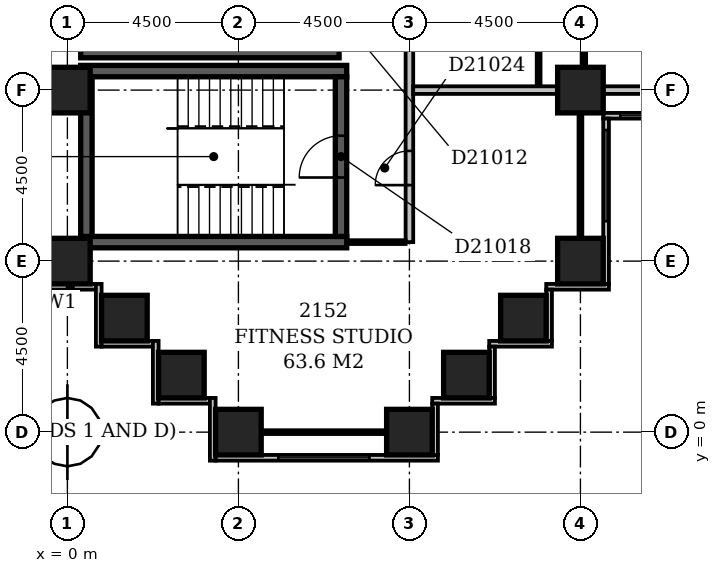
"""IFC4 building model, lengths in metres.
Left out: names, types, materials, properties, quantities, classifications, styles, units other than length and angle.
Written with IfcOpenShell. Run it as: python <this file> out.ifc"""

import sys

from ifc_helpers import new_model, si_unit, direction, frame, frame_2d, origin, origin_2d, place, context, subcontext, project, spatial, rectangle, extrude, element, fill, save


model = new_model("IFC4")
c1 = context("Model", 3, precision=1e-05, world=origin(), true_north=direction((0.0, 1.0)))
c2 = subcontext(c1, "Body", "Model", "MODEL_VIEW")
j1 = project(units=[si_unit("LENGTHUNIT", "METRE"), si_unit("PLANEANGLEUNIT", "RADIAN")], contexts=[c1])
p1 = place(None, origin())
s1 = spatial("IfcSite", under=j1, at=p1, CompositionType="ELEMENT")
p2 = place(p1, origin())
s2 = spatial("IfcBuilding", under=s1, at=p2, CompositionType="ELEMENT")
p3 = place(p2, frame((0.0, 0.0, 86.6)))
s3 = spatial("IfcBuildingStorey", under=s2, at=p3, CompositionType="ELEMENT", Elevation=86.6)
for number, where, z_axis, x_axis in (
    (1, (0.35, 5.0, -0.3), (0.0, 0.0, 1.0), (1.0, 0.0, 0.0)),
    (2, (0.35, 9.5, -0.3), (0.0, 0.0, 1.0), (1.0, 0.0, 0.0)),
):
    element("IfcWall", number, at=place(p3, frame(where, z_axis=z_axis, x_axis=x_axis)), inside=s3, PredefinedType="SHEAR", context=c2, shape_type="SweptSolid", body=[
        extrude(rectangle(XDim=7.0, YDim=0.3, at=frame_2d((3.5, 0.0))), origin(), (0.0, 0.0, 1.0), 3.6),
    ])
p4 = place(p3, frame((0.35, 10.0, -0.3), z_axis=(0.0, 0.0, 1.0), x_axis=(1.0, 0.0, 0.0)))
e3 = element("IfcWall", 3, at=p4, inside=s3, PredefinedType="SHEAR", context=c2, shape_type="SweptSolid", body=[
    extrude(rectangle(XDim=6.8, YDim=0.3, at=frame_2d((3.4, 0.0))), origin(), (0.0, 0.0, 1.0), 3.6),
])
p5 = place(p3, frame((0.5, 5.15, -0.3), z_axis=(0.0, 0.0, 1.0), x_axis=(0.0, 1.0, 0.0)))
e4 = element("IfcWall", 4, at=p5, inside=s3, PredefinedType="SHEAR", context=c2, shape_type="SweptSolid", body=[
    extrude(rectangle(XDim=4.2, YDim=0.3, at=frame_2d((2.1, 0.0))), origin(), (0.0, 0.0, 1.0), 3.6),
])
p6 = place(p3, frame((7.2, 5.15, -0.3), z_axis=(0.0, 0.0, 1.0), x_axis=(0.0, 1.0, 0.0)))
e5 = element("IfcWall", 5, at=p6, inside=s3, PredefinedType="SHEAR", context=c2, shape_type="SweptSolid", body=[
    extrude(rectangle(XDim=4.2, YDim=0.3, at=frame_2d((2.1, 0.0))), origin(), (0.0, 0.0, 1.0), 3.6),
])
p7 = place(p6, frame((1.55, 0.0, 0.3)))
e6 = element("IfcOpeningElement", 6, at=p7, cuts=e5, PredefinedType="OPENING", context=c2, shape_type="SweptSolid", body=[
    extrude(rectangle(XDim=1.1, YDim=2.1, at=frame_2d((0.55, 1.05))), frame((0.0, 0.162, 0.0), z_axis=(0.0, -1.0, 0.0), x_axis=(1.0, 0.0, 0.0)), (0.0, 0.0, 1.0), 0.324),
])
for number, where, z_axis, x_axis in (
    (7, (4.5, 0.0, -0.3), (0.0, 0.0, 1.0), (1.0, 0.0, 0.0)),
    (8, (9.0, 0.0, -0.3), (0.0, 0.0, 1.0), (1.0, 0.0, 0.0)),
    (9, (3.0, 1.5, -0.3), (0.0, 0.0, 1.0), (1.0, 0.0, 0.0)),
    (10, (10.5, 1.5, -0.3), (0.0, 0.0, 1.0), (1.0, 0.0, 0.0)),
    (11, (1.5, 3.0, -0.3), (0.0, 0.0, 1.0), (1.0, 0.0, 0.0)),
    (12, (12.0, 3.0, -0.3), (0.0, 0.0, 1.0), (1.0, 0.0, 0.0)),
    (13, (0.0, 4.5, -0.3), (0.0, 0.0, 1.0), (1.0, 0.0, 0.0)),
    (14, (13.5, 4.5, -0.3), (0.0, 0.0, 1.0), (1.0, 0.0, 0.0)),
    (15, (0.0, 9.0, -0.3), (0.0, 0.0, 1.0), (1.0, 0.0, 0.0)),
    (16, (13.5, 9.0, -0.3), (0.0, 0.0, 1.0), (1.0, 0.0, 0.0)),
):
    element("IfcColumn", number, at=place(p3, frame(where, z_axis=z_axis, x_axis=x_axis)), inside=s3, PredefinedType="COLUMN", context=c2, shape_type="SweptSolid", body=[
        extrude(rectangle(XDim=1.2, YDim=1.2, at=origin_2d()), origin(), (0.0, 0.0, 1.0), 3.6),
    ])
p8 = place(p3, frame((9.675, -0.6, 0.0), z_axis=(0.0, 0.0, 1.0), x_axis=(0.0, 1.0, 0.0)))
e17 = element("IfcWall", 17, at=p8, inside=s3, PredefinedType="STANDARD", context=c2, shape_type="SweptSolid", body=[
    extrude(rectangle(XDim=1.35, YDim=0.15, at=frame_2d((0.675, 0.0))), origin(), (0.0, 0.0, 1.0), 2.7),
])
p9 = place(p3, frame((9.6, 0.825, 0.0), z_axis=(0.0, 0.0, 1.0), x_axis=(1.0, 0.0, 0.0)))
e18 = element("IfcWall", 18, at=p9, inside=s3, PredefinedType="STANDARD", context=c2, shape_type="SweptSolid", body=[
    extrude(rectangle(XDim=1.65, YDim=0.15, at=frame_2d((0.825, 0.0))), origin(), (0.0, 0.0, 1.0), 2.7),
])
p10 = place(p3, frame((11.175, 0.9, 0.0), z_axis=(0.0, 0.0, 1.0), x_axis=(0.0, 1.0, 0.0)))
e19 = element("IfcWall", 19, at=p10, inside=s3, PredefinedType="STANDARD", context=c2, shape_type="SweptSolid", body=[
    extrude(rectangle(XDim=1.35, YDim=0.15, at=frame_2d((0.675, 0.0))), origin(), (0.0, 0.0, 1.0), 2.7),
])
p11 = place(p3, frame((11.1, 2.325, 0.0), z_axis=(0.0, 0.0, 1.0), x_axis=(1.0, 0.0, 0.0)))
e20 = element("IfcWall", 20, at=p11, inside=s3, PredefinedType="STANDARD", context=c2, shape_type="SweptSolid", body=[
    extrude(rectangle(XDim=1.65, YDim=0.15, at=frame_2d((0.825, 0.0))), origin(), (0.0, 0.0, 1.0), 2.7),
])
p12 = place(p3, frame((12.675, 2.4, 0.0), z_axis=(0.0, 0.0, 1.0), x_axis=(0.0, 1.0, 0.0)))
e21 = element("IfcWall", 21, at=p12, inside=s3, PredefinedType="STANDARD", context=c2, shape_type="SweptSolid", body=[
    extrude(rectangle(XDim=1.35, YDim=0.15, at=frame_2d((0.675, 0.0))), origin(), (0.0, 0.0, 1.0), 2.7),
])
p13 = place(p3, frame((12.6, 3.825, 0.0), z_axis=(0.0, 0.0, 1.0), x_axis=(1.0, 0.0, 0.0)))
e22 = element("IfcWall", 22, at=p13, inside=s3, PredefinedType="STANDARD", context=c2, shape_type="SweptSolid", body=[
    extrude(rectangle(XDim=1.65, YDim=0.15, at=frame_2d((0.825, 0.0))), origin(), (0.0, 0.0, 1.0), 2.7),
])
p14 = place(p3, frame((14.175, 3.9, 0.0), z_axis=(0.0, 0.0, 1.0), x_axis=(0.0, 1.0, 0.0)))
e23 = element("IfcWall", 23, at=p14, inside=s3, PredefinedType="STANDARD", context=c2, shape_type="SweptSolid", body=[
    extrude(rectangle(XDim=4.35, YDim=0.15, at=frame_2d((2.175, 0.0))), origin(), (0.0, 0.0, 1.0), 2.7),
])
p15 = place(p14, frame((1.65, 0.0, 0.6)))
e24 = element("IfcOpeningElement", 24, at=p15, cuts=e23, PredefinedType="OPENING", context=c2, shape_type="SweptSolid", body=[
    extrude(rectangle(XDim=2.4, YDim=1.8, at=frame_2d((1.2, 0.9))), frame((0.0, 0.087, 0.0), z_axis=(0.0, -1.0, 0.0), x_axis=(1.0, 0.0, 0.0)), (0.0, 0.0, 1.0), 0.174),
])
p16 = place(p3, frame((14.1, 8.325, 0.0), z_axis=(0.0, 0.0, 1.0), x_axis=(1.0, 0.0, 0.0)))
e25 = element("IfcWall", 25, at=p16, inside=s3, PredefinedType="STANDARD", context=c2, shape_type="SweptSolid", body=[
    extrude(rectangle(XDim=4.65, YDim=0.15, at=frame_2d((2.325, 0.0))), origin(), (0.0, 0.0, 1.0), 2.7),
])
p17 = place(p16, frame((0.45, 0.0, 0.6)))
e26 = element("IfcOpeningElement", 26, at=p17, cuts=e25, PredefinedType="OPENING", context=c2, shape_type="SweptSolid", body=[
    extrude(rectangle(XDim=2.4, YDim=1.8, at=frame_2d((1.2, 0.9))), frame((0.0, 0.087, 0.0), z_axis=(0.0, -1.0, 0.0), x_axis=(1.0, 0.0, 0.0)), (0.0, 0.0, 1.0), 0.174),
])
p18 = place(p3, frame((-0.6, 3.825, 0.0), z_axis=(0.0, 0.0, 1.0), x_axis=(1.0, 0.0, 0.0)))
e27 = element("IfcWall", 27, at=p18, inside=s3, PredefinedType="STANDARD", context=c2, shape_type="SweptSolid", body=[
    extrude(rectangle(XDim=1.35, YDim=0.15, at=frame_2d((0.675, 0.0))), origin(), (0.0, 0.0, 1.0), 2.7),
])
p19 = place(p3, frame((0.825, 3.9, 0.0), z_axis=(0.0, 0.0, 1.0), x_axis=(0.0, -1.0, 0.0)))
e28 = element("IfcWall", 28, at=p19, inside=s3, PredefinedType="STANDARD", context=c2, shape_type="SweptSolid", body=[
    extrude(rectangle(XDim=1.65, YDim=0.15, at=frame_2d((0.825, 0.0))), origin(), (0.0, 0.0, 1.0), 2.7),
])
p20 = place(p3, frame((0.9, 2.325, 0.0), z_axis=(0.0, 0.0, 1.0), x_axis=(1.0, 0.0, 0.0)))
e29 = element("IfcWall", 29, at=p20, inside=s3, PredefinedType="STANDARD", context=c2, shape_type="SweptSolid", body=[
    extrude(rectangle(XDim=1.35, YDim=0.15, at=frame_2d((0.675, 0.0))), origin(), (0.0, 0.0, 1.0), 2.7),
])
p21 = place(p3, frame((2.325, 2.4, 0.0), z_axis=(0.0, 0.0, 1.0), x_axis=(0.0, -1.0, 0.0)))
e30 = element("IfcWall", 30, at=p21, inside=s3, PredefinedType="STANDARD", context=c2, shape_type="SweptSolid", body=[
    extrude(rectangle(XDim=1.65, YDim=0.15, at=frame_2d((0.825, 0.0))), origin(), (0.0, 0.0, 1.0), 2.7),
])
p22 = place(p3, frame((2.4, 0.825, 0.0), z_axis=(0.0, 0.0, 1.0), x_axis=(1.0, 0.0, 0.0)))
e31 = element("IfcWall", 31, at=p22, inside=s3, PredefinedType="STANDARD", context=c2, shape_type="SweptSolid", body=[
    extrude(rectangle(XDim=1.35, YDim=0.15, at=frame_2d((0.675, 0.0))), origin(), (0.0, 0.0, 1.0), 2.7),
])
p23 = place(p3, frame((3.825, 0.9, 0.0), z_axis=(0.0, 0.0, 1.0), x_axis=(0.0, -1.0, 0.0)))
e32 = element("IfcWall", 32, at=p23, inside=s3, PredefinedType="STANDARD", context=c2, shape_type="SweptSolid", body=[
    extrude(rectangle(XDim=1.65, YDim=0.15, at=frame_2d((0.825, 0.0))), origin(), (0.0, 0.0, 1.0), 2.7),
])
p24 = place(p3, frame((3.9, -0.675, 0.0), z_axis=(0.0, 0.0, 1.0), x_axis=(1.0, 0.0, 0.0)))
e33 = element("IfcWall", 33, at=p24, inside=s3, PredefinedType="STANDARD", context=c2, shape_type="SweptSolid", body=[
    extrude(rectangle(XDim=5.85, YDim=0.15, at=frame_2d((2.925, 0.0))), origin(), (0.0, 0.0, 1.0), 2.7),
])
p25 = place(p24, frame((1.65, 0.0, 0.6)))
e34 = element("IfcOpeningElement", 34, at=p25, cuts=e33, PredefinedType="OPENING", context=c2, shape_type="SweptSolid", body=[
    extrude(rectangle(XDim=2.4, YDim=1.8, at=frame_2d((1.2, 0.9))), frame((0.0, 0.087, 0.0), z_axis=(0.0, -1.0, 0.0), x_axis=(1.0, 0.0, 0.0)), (0.0, 0.0, 1.0), 0.174),
])
p26 = place(p3, frame((5.1, 0.0, 0.0), z_axis=(0.0, 0.0, 1.0), x_axis=(1.0, 0.0, 0.0)))
e35 = element("IfcWall", 35, at=p26, inside=s3, PredefinedType="PARTITIONING", context=c2, shape_type="SweptSolid", body=[
    extrude(rectangle(XDim=3.3, YDim=0.1, at=frame_2d((1.65, 0.0))), origin(), (0.0, 0.0, 1.0), 2.7),
])
p27 = place(p3, frame((0.0, 4.4, 0.0), z_axis=(0.0, 0.0, 1.0), x_axis=(0.0, 1.0, 0.0)))
e36 = element("IfcWall", 36, at=p27, inside=s3, PredefinedType="PARTITIONING", context=c2, shape_type="SweptSolid", body=[
    extrude(rectangle(XDim=0.7, YDim=0.1, at=frame_2d((0.35, 0.0))), origin(), (0.0, 0.0, 1.0), 2.7),
])
p28 = place(p3, frame((7.349, 5.0, 0.0), z_axis=(0.0, 0.0, 1.0), x_axis=(1.0, 0.0, 0.0)))
e37 = element("IfcWall", 37, at=p28, inside=s3, PredefinedType="PARTITIONING", context=c2, shape_type="SweptSolid", body=[
    extrude(rectangle(XDim=1.551, YDim=0.1, at=frame_2d((0.775, 0.0))), origin(), (0.0, 0.0, 1.0), 3.3),
])
p29 = place(p3, frame((9.0, 5.0, 0.0), z_axis=(0.0, 0.0, 1.0), x_axis=(0.0, 1.0, 0.0)))
e38 = element("IfcWall", 38, at=p29, inside=s3, PredefinedType="PARTITIONING", context=c2, shape_type="SweptSolid", body=[
    extrude(rectangle(XDim=44.5, YDim=0.2, at=frame_2d((22.25, 0.0))), origin(), (0.0, 0.0, 1.0), 3.3),
])
p30 = place(p29, frame((28.45, 0.0, 0.0)))
e39 = element("IfcOpeningElement", 39, at=p30, cuts=e38, PredefinedType="OPENING", context=c2, shape_type="SweptSolid", body=[
    extrude(rectangle(XDim=1.0, YDim=2.1, at=frame_2d((0.5, 1.05))), frame((0.0, 0.112, 0.0), z_axis=(0.0, -1.0, 0.0), x_axis=(1.0, 0.0, 0.0)), (0.0, 0.0, 1.0), 0.224),
])
p31 = place(p29, frame((22.8, 0.0, 0.0)))
e40 = element("IfcOpeningElement", 40, at=p31, cuts=e38, PredefinedType="OPENING", context=c2, shape_type="SweptSolid", body=[
    extrude(rectangle(XDim=1.0, YDim=2.1, at=frame_2d((0.5, 1.05))), frame((0.0, 0.112, 0.0), z_axis=(0.0, -1.0, 0.0), x_axis=(1.0, 0.0, 0.0)), (0.0, 0.0, 1.0), 0.224),
])
p32 = place(p29, frame((14.55, 0.0, 0.0)))
e41 = element("IfcOpeningElement", 41, at=p32, cuts=e38, PredefinedType="OPENING", context=c2, shape_type="SweptSolid", body=[
    extrude(rectangle(XDim=1.0, YDim=2.1, at=frame_2d((0.5, 1.05))), frame((0.0, 0.112, 0.0), z_axis=(0.0, -1.0, 0.0), x_axis=(1.0, 0.0, 0.0)), (0.0, 0.0, 1.0), 0.224),
])
p33 = place(p29, frame((9.3, 0.0, 0.0)))
e42 = element("IfcOpeningElement", 42, at=p33, cuts=e38, PredefinedType="OPENING", context=c2, shape_type="SweptSolid", body=[
    extrude(rectangle(XDim=1.0, YDim=2.1, at=frame_2d((0.5, 1.05))), frame((0.0, 0.112, 0.0), z_axis=(0.0, -1.0, 0.0), x_axis=(1.0, 0.0, 0.0)), (0.0, 0.0, 1.0), 0.224),
])
p34 = place(p29, frame((35.0, 0.0, 0.0)))
e43 = element("IfcOpeningElement", 43, at=p34, cuts=e38, PredefinedType="OPENING", context=c2, shape_type="SweptSolid", body=[
    extrude(rectangle(XDim=0.9, YDim=2.1, at=frame_2d((0.45, 1.05))), frame((0.0, 0.112, 0.0), z_axis=(0.0, -1.0, 0.0), x_axis=(1.0, 0.0, 0.0)), (0.0, 0.0, 1.0), 0.224),
])
p35 = place(p29, frame((1.5, 0.0, 0.0)))
e44 = element("IfcOpeningElement", 44, at=p35, cuts=e38, PredefinedType="OPENING", context=c2, shape_type="SweptSolid", body=[
    extrude(rectangle(XDim=0.9, YDim=2.1, at=frame_2d((0.45, 1.05))), frame((0.0, 0.112, 0.0), z_axis=(0.0, -1.0, 0.0), x_axis=(1.0, 0.0, 0.0)), (0.0, 0.0, 1.0), 0.224),
])
p36 = place(p3, frame((13.5, 5.1, 0.0), z_axis=(0.0, 0.0, 1.0), x_axis=(0.0, 1.0, 0.0)))
e45 = element("IfcWall", 45, at=p36, inside=s3, PredefinedType="PARTITIONING", context=c2, shape_type="SweptSolid", body=[
    extrude(rectangle(XDim=3.3, YDim=0.1, at=frame_2d((1.65, 0.0))), origin(), (0.0, 0.0, 1.0), 2.7),
])
p37 = place(p3, frame((9.1, 9.0, 0.0), z_axis=(0.0, 0.0, 1.0), x_axis=(1.0, 0.0, 0.0)))
e46 = element("IfcWall", 46, at=p37, inside=s3, PredefinedType="PARTITIONING", context=c2, shape_type="SweptSolid", body=[
    extrude(rectangle(XDim=3.8, YDim=0.2, at=frame_2d((1.9, 0.0))), origin(), (0.0, 0.0, 1.0), 3.3),
])
p38 = place(p3, frame((14.1, 9.0, 0.0), z_axis=(0.0, 0.0, 1.0), x_axis=(1.0, 0.0, 0.0)))
e47 = element("IfcWall", 47, at=p38, inside=s3, PredefinedType="PARTITIONING", context=c2, shape_type="SweptSolid", body=[
    extrude(rectangle(XDim=3.3, YDim=0.2, at=frame_2d((1.65, 0.0))), origin(), (0.0, 0.0, 1.0), 2.7),
])
p39 = place(p3, frame((12.4, 9.1, 0.0), z_axis=(0.0, 0.0, 1.0), x_axis=(0.0, 1.0, 0.0)))
e48 = element("IfcWall", 48, at=p39, inside=s3, PredefinedType="PARTITIONING", context=c2, shape_type="SweptSolid", body=[
    extrude(rectangle(XDim=4.9, YDim=0.1, at=frame_2d((2.45, 0.0))), origin(), (0.0, 0.0, 1.0), 3.3),
])
p40 = place(p39, frame((1.95, 0.0, 0.0)))
e49 = element("IfcOpeningElement", 49, at=p40, cuts=e48, PredefinedType="OPENING", context=c2, shape_type="SweptSolid", body=[
    extrude(rectangle(XDim=0.9, YDim=2.1, at=frame_2d((0.45, 1.05))), frame((0.0, 0.062, 0.0), z_axis=(0.0, -1.0, 0.0), x_axis=(1.0, 0.0, 0.0)), (0.0, 0.0, 1.0), 0.124),
])
p41 = place(p3, frame((13.6, 9.6, 0.0), z_axis=(0.0, 0.0, 1.0), x_axis=(0.0, 1.0, 0.0)))
e50 = element("IfcWall", 50, at=p41, inside=s3, PredefinedType="PARTITIONING", context=c2, shape_type="SweptSolid", body=[
    extrude(rectangle(XDim=8.3, YDim=0.1, at=frame_2d((4.15, 0.0))), origin(), (0.0, 0.0, 1.0), 3.3),
])
p42 = place(p41, frame((1.2, 0.0, 0.0)))
e51 = element("IfcOpeningElement", 51, at=p42, cuts=e50, PredefinedType="OPENING", context=c2, shape_type="SweptSolid", body=[
    extrude(rectangle(XDim=0.9, YDim=2.1, at=frame_2d((0.45, 1.05))), frame((0.0, 0.062, 0.0), z_axis=(0.0, -1.0, 0.0), x_axis=(1.0, 0.0, 0.0)), (0.0, 0.0, 1.0), 0.124),
])
p43 = place(p41, frame((5.7, 0.0, 0.0)))
e52 = element("IfcOpeningElement", 52, at=p43, cuts=e50, PredefinedType="OPENING", context=c2, shape_type="SweptSolid", body=[
    extrude(rectangle(XDim=0.9, YDim=2.1, at=frame_2d((0.45, 1.05))), frame((0.0, 0.062, 0.0), z_axis=(0.0, -1.0, 0.0), x_axis=(1.0, 0.0, 0.0)), (0.0, 0.0, 1.0), 0.124),
])
p44 = place(p15, origin())
e53 = element("IfcWindow", 53, at=p44, inside=s3, PartitioningType="SINGLE_PANEL", PredefinedType="WINDOW", context=c2, shape_type="SweptSolid", body=[
    extrude(rectangle(XDim=2.4, YDim=1.8, at=frame_2d((1.2, 0.9))), frame((0.0, 0.03, 0.0), z_axis=(0.0, -1.0, 0.0), x_axis=(1.0, 0.0, 0.0)), (0.0, 0.0, 1.0), 0.06),
])
fill(e24, e53)
p45 = place(p17, origin())
e54 = element("IfcWindow", 54, at=p45, inside=s3, PartitioningType="SINGLE_PANEL", PredefinedType="WINDOW", context=c2, shape_type="SweptSolid", body=[
    extrude(rectangle(XDim=2.4, YDim=1.8, at=frame_2d((1.2, 0.9))), frame((0.0, 0.03, 0.0), z_axis=(0.0, -1.0, 0.0), x_axis=(1.0, 0.0, 0.0)), (0.0, 0.0, 1.0), 0.06),
])
fill(e26, e54)
p46 = place(p25, origin())
e55 = element("IfcWindow", 55, at=p46, inside=s3, PartitioningType="SINGLE_PANEL", PredefinedType="WINDOW", context=c2, shape_type="SweptSolid", body=[
    extrude(rectangle(XDim=2.4, YDim=1.8, at=frame_2d((1.2, 0.9))), frame((0.0, 0.03, 0.0), z_axis=(0.0, -1.0, 0.0), x_axis=(1.0, 0.0, 0.0)), (0.0, 0.0, 1.0), 0.06),
])
fill(e34, e55)
p47 = place(p7, origin())
e56 = element("IfcDoor", 56, at=p47, inside=s3, OperationType="SINGLE_SWING_LEFT", PredefinedType="DOOR", context=c2, shape_type="SweptSolid", body=[
    extrude(rectangle(XDim=1.1, YDim=2.1, at=frame_2d((0.55, 1.05))), frame((0.0, 0.025, 0.0), z_axis=(0.0, -1.0, 0.0), x_axis=(1.0, 0.0, 0.0)), (0.0, 0.0, 1.0), 0.05),
])
fill(e6, e56)
p48 = place(p35, origin())
e57 = element("IfcDoor", 57, at=p48, inside=s3, OperationType="SINGLE_SWING_LEFT", PredefinedType="DOOR", context=c2, shape_type="SweptSolid", body=[
    extrude(rectangle(XDim=0.9, YDim=2.1, at=frame_2d((0.45, 1.05))), frame((0.0, 0.025, 0.0), z_axis=(0.0, -1.0, 0.0), x_axis=(1.0, 0.0, 0.0)), (0.0, 0.0, 1.0), 0.05),
])
fill(e44, e57)
save(model, sys.argv[1])
